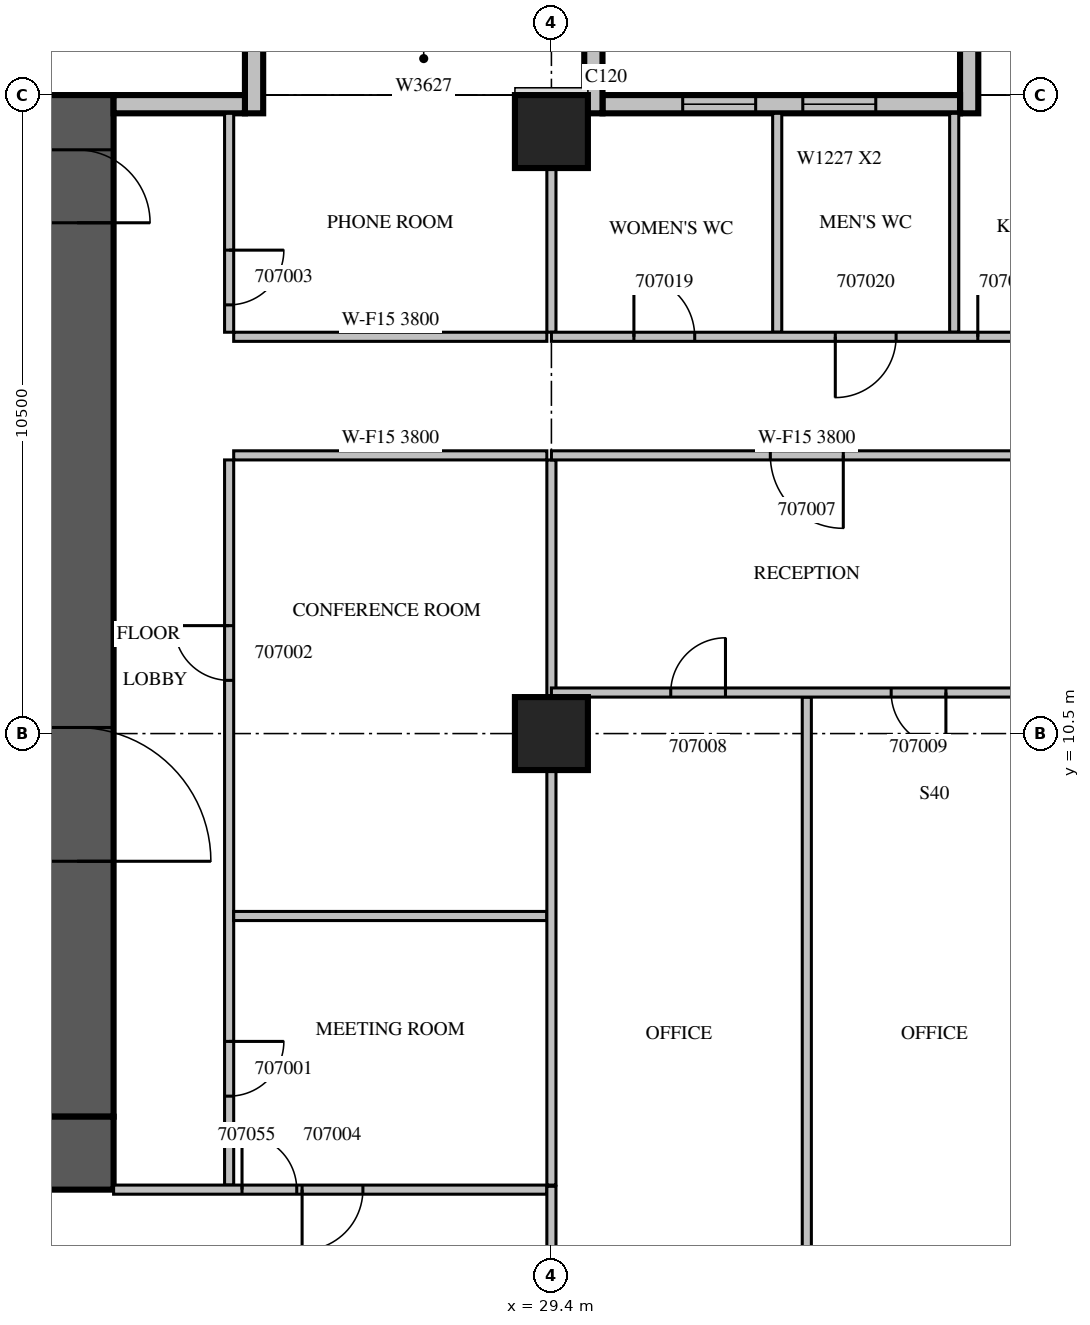
"""IFC4 building model, lengths in metres.
Left out: names, types, materials, properties, quantities, classifications, styles, units other than length and angle.
Written with IfcOpenShell. Run it as: python <this file> out.ifc"""

import sys

from ifc_helpers import new_model, si_unit, direction, frame, frame_2d, origin, origin_2d, place, context, subcontext, project, spatial, rectangle, extrude, source, transform, mapped, element, fill, save


model = new_model("IFC4")
c1 = context("Model", 3, precision=1e-05, world=origin(), true_north=direction((0.0, 1.0)))
c2 = subcontext(c1, "Body", "Model", "MODEL_VIEW")
j1 = project(units=[si_unit("LENGTHUNIT", "METRE"), si_unit("PLANEANGLEUNIT", "RADIAN")], contexts=[c1])
p1 = place(None, origin())
s1 = spatial("IfcSite", under=j1, at=p1, CompositionType="ELEMENT")
p2 = place(p1, origin())
s2 = spatial("IfcBuilding", under=s1, at=p2, CompositionType="ELEMENT")
p3 = place(p2, frame((0.0, 0.0, 40.5)))
s3 = spatial("IfcBuildingStorey", under=s2, at=p3, CompositionType="ELEMENT", Elevation=40.5)
m1 = source(origin(), c2, "Body", "SweptSolid", [
    extrude(rectangle(XDim=1.2, YDim=1.2, at=origin_2d()), origin(), (0.0, 0.0, 1.0), 4.2),
])
for number, where, z_axis, x_axis in (
    (1, (29.4, 10.5, 0.0), (0.0, 0.0, 1.0), (1.0, 0.0, 0.0)),
    (2, (29.4, 20.4, 0.0), (0.0, 0.0, 1.0), (1.0, 0.0, 0.0)),
):
    element("IfcColumn", number, at=place(p3, frame(where, z_axis=z_axis, x_axis=x_axis)), inside=s3, PredefinedType="COLUMN", context=c2, shape_type="MappedRepresentation", body=[
        mapped(m1, transform((0.0, 0.0, 0.0), scale=1.0)),
    ])
p4 = place(p3, frame((21.6, 4.2, 0.0), z_axis=(0.0, 0.0, 1.0), x_axis=(0.0, 1.0, 0.0)))
e3 = element("IfcWall", 3, at=p4, inside=s3, PredefinedType="SHEAR", context=c2, shape_type="SweptSolid", body=[
    extrude(rectangle(XDim=16.8, YDim=1.2, at=frame_2d((8.4, 0.0))), origin(), (0.0, 0.0, 1.0), 4.2),
])
m2 = source(origin(), c2, "Body", "SweptSolid", [
    extrude(rectangle(XDim=2.2, YDim=2.1, at=frame_2d((1.1, 1.05))), frame((0.0, 0.61, 0.0), z_axis=(0.0, -1.0, 0.0), x_axis=(1.0, 0.0, 0.0)), (0.0, 0.0, 1.0), 1.22),
])
p5 = place(p4, frame((4.2, 0.0, 0.0)))
e4 = element("IfcOpeningElement", 4, at=p5, cuts=e3, PredefinedType="OPENING", context=c2, shape_type="MappedRepresentation", body=[
    mapped(m2, transform((0.0, 0.0, 0.0), scale=1.0)),
])
m3 = source(origin(), c2, "Body", "SweptSolid", [
    extrude(rectangle(XDim=1.2, YDim=2.1, at=frame_2d((0.6, 1.05))), frame((0.0, 0.61, 0.0), z_axis=(0.0, -1.0, 0.0), x_axis=(1.0, 0.0, 0.0)), (0.0, 0.0, 1.0), 1.22),
])
p6 = place(p4, frame((14.7, 0.0, 0.0)))
e5 = element("IfcOpeningElement", 5, at=p6, cuts=e3, PredefinedType="OPENING", context=c2, shape_type="MappedRepresentation", body=[
    mapped(m3, transform((0.0, 0.0, 0.0), scale=1.0)),
])
m4 = source(origin(), c2, "Body", "SweptSolid", [
    extrude(rectangle(XDim=18.0, YDim=1.2, at=frame_2d((9.0, 0.0))), origin(), (0.0, 0.0, 1.0), 4.2),
])
p7 = place(p3, frame((4.2, 3.6, 0.0), z_axis=(0.0, 0.0, 1.0), x_axis=(1.0, 0.0, 0.0)))
e6 = element("IfcWall", 6, at=p7, inside=s3, PredefinedType="SHEAR", context=c2, shape_type="MappedRepresentation", body=[
    mapped(m4, transform((0.0, 0.0, 0.0), scale=1.0)),
])
m5 = source(origin(), c2, "Body", "SweptSolid", [
    extrude(rectangle(XDim=1.2, YDim=0.3, at=frame_2d((0.6, 0.0))), origin(), (0.0, 0.0, 1.0), 3.8),
])
p8 = place(p3, frame((36.27, 20.7, 0.0), z_axis=(0.0, 0.0, 1.0), x_axis=(0.0, 1.0, 0.0)))
e7 = element("IfcWall", 7, at=p8, inside=s3, PredefinedType="STANDARD", context=c2, shape_type="MappedRepresentation", body=[
    mapped(m5, transform((0.0, 0.0, 0.0), scale=1.0)),
])
m6 = source(origin(), c2, "Body", "SweptSolid", [
    extrude(rectangle(XDim=5.88, YDim=0.3, at=frame_2d((2.94, 0.0))), origin(), (0.0, 0.0, 1.0), 3.8),
])
p9 = place(p3, frame((36.12, 20.85, 0.0), z_axis=(0.0, 0.0, 1.0), x_axis=(-1.0, 0.0, 0.0)))
e8 = element("IfcWall", 8, at=p9, inside=s3, PredefinedType="STANDARD", context=c2, shape_type="MappedRepresentation", body=[
    mapped(m6, transform((0.0, 0.0, 0.0), scale=1.0)),
])
m7 = source(origin(), c2, "Body", "SweptSolid", [
    extrude(rectangle(XDim=1.2, YDim=2.7, at=frame_2d((0.6, 1.35))), frame((0.0, 0.16, 0.0), z_axis=(0.0, -1.0, 0.0), x_axis=(1.0, 0.0, 0.0)), (0.0, 0.0, 1.0), 0.32),
])
p10 = place(p9, frame((1.386, 0.0, 0.6)))
e9 = element("IfcOpeningElement", 9, at=p10, cuts=e8, PredefinedType="OPENING", context=c2, shape_type="MappedRepresentation", body=[
    mapped(m7, transform((0.0, 0.0, 0.0), scale=1.0)),
])
p11 = place(p9, frame((3.361, 0.0, 0.6)))
e10 = element("IfcOpeningElement", 10, at=p11, cuts=e8, PredefinedType="OPENING", context=c2, shape_type="MappedRepresentation", body=[
    mapped(m7, transform((0.0, 0.0, 0.0), scale=1.0)),
])
for number, where, z_axis, x_axis in (
    (11, (30.09, 20.7, 0.0), (0.0, 0.0, 1.0), (0.0, 1.0, 0.0)),
    (12, (24.51, 20.7, 0.0), (0.0, 0.0, 1.0), (0.0, 1.0, 0.0)),
):
    element("IfcWall", number, at=place(p3, frame(where, z_axis=z_axis, x_axis=x_axis)), inside=s3, PredefinedType="STANDARD", context=c2, shape_type="MappedRepresentation", body=[
        mapped(m5, transform((0.0, 0.0, 0.0), scale=1.0)),
    ])
p12 = place(p3, frame((24.36, 20.85, 0.0), z_axis=(0.0, 0.0, 1.0), x_axis=(-1.0, 0.0, 0.0)))
e13 = element("IfcWall", 13, at=p12, inside=s3, PredefinedType="STANDARD", context=c2, shape_type="SweptSolid", body=[
    extrude(rectangle(XDim=2.16, YDim=0.3, at=frame_2d((1.08, 0.0))), origin(), (0.0, 0.0, 1.0), 3.8),
])
p13 = place(p3, frame((24.1, 15.0, 0.0), z_axis=(0.0, 0.0, 1.0), x_axis=(0.0, -1.0, 0.0)))
e14 = element("IfcWall", 14, at=p13, inside=s3, PredefinedType="PARTITIONING", context=c2, shape_type="SweptSolid", body=[
    extrude(rectangle(XDim=11.925, YDim=0.15, at=frame_2d((5.963, 0.0))), origin(), (0.0, 0.0, 1.0), 3.8),
])
p14 = place(p13, frame((9.562, 0.0, 0.0)))
e15 = element("IfcOpeningElement", 15, at=p14, cuts=e14, PredefinedType="OPENING", context=c2, shape_type="SweptSolid", body=[
    extrude(rectangle(XDim=0.9, YDim=2.1, at=frame_2d((0.45, 1.05))), frame((0.0, 0.085, 0.0), z_axis=(0.0, -1.0, 0.0), x_axis=(1.0, 0.0, 0.0)), (0.0, 0.0, 1.0), 0.17),
])
m8 = source(origin(), c2, "Body", "SweptSolid", [
    extrude(rectangle(XDim=0.9, YDim=2.1, at=frame_2d((0.45, 1.05))), frame((0.0, 0.085, 0.0), z_axis=(0.0, -1.0, 0.0), x_axis=(1.0, 0.0, 0.0)), (0.0, 0.0, 1.0), 0.17),
])
p15 = place(p13, frame((2.725, 0.0, 0.0)))
e16 = element("IfcOpeningElement", 16, at=p15, cuts=e14, PredefinedType="OPENING", context=c2, shape_type="MappedRepresentation", body=[
    mapped(m8, transform((0.0, 0.0, 0.0), scale=1.0)),
])
p16 = place(p3, frame((24.1, 20.7, 0.0), z_axis=(0.0, 0.0, 1.0), x_axis=(0.0, -1.0, 0.0)))
e17 = element("IfcWall", 17, at=p16, inside=s3, PredefinedType="PARTITIONING", context=c2, shape_type="SweptSolid", body=[
    extrude(rectangle(XDim=3.6, YDim=0.15, at=frame_2d((1.8, 0.0))), origin(), (0.0, 0.0, 1.0), 3.8),
])
p17 = place(p16, frame((2.25, 0.0, 0.0)))
e18 = element("IfcOpeningElement", 18, at=p17, cuts=e17, PredefinedType="OPENING", context=c2, shape_type="MappedRepresentation", body=[
    mapped(m8, transform((0.0, 0.0, 0.0), scale=1.0)),
])
p18 = place(p3, frame((29.325, 7.5, 0.0), z_axis=(0.0, 0.0, 1.0), x_axis=(-1.0, 0.0, 0.0)))
e19 = element("IfcWall", 19, at=p18, inside=s3, PredefinedType="PARTITIONING", context=c2, shape_type="SweptSolid", body=[
    extrude(rectangle(XDim=5.15, YDim=0.15, at=frame_2d((2.575, 0.0))), origin(), (0.0, 0.0, 1.0), 3.8),
])
m9 = source(origin(), c2, "Body", "SweptSolid", [
    extrude(rectangle(XDim=5.15, YDim=0.15, at=frame_2d((2.575, 0.0))), origin(), (0.0, 0.0, 1.0), 3.8),
])
for number, where, z_axis, x_axis in (
    (20, (29.325, 15.075, 0.0), (0.0, 0.0, 1.0), (-1.0, 0.0, 0.0)),
    (21, (24.175, 17.025, 0.0), (0.0, 0.0, 1.0), (1.0, 0.0, 0.0)),
):
    element("IfcWall", number, at=place(p3, frame(where, z_axis=z_axis, x_axis=x_axis)), inside=s3, PredefinedType="PARTITIONING", context=c2, shape_type="MappedRepresentation", body=[
        mapped(m9, transform((0.0, 0.0, 0.0), scale=1.0)),
    ])
p19 = place(p3, frame((29.4, 3.075, 0.0), z_axis=(0.0, 0.0, 1.0), x_axis=(0.0, 1.0, 0.0)))
e22 = element("IfcWall", 22, at=p19, inside=s3, PredefinedType="PARTITIONING", context=c2, shape_type="SweptSolid", body=[
    extrude(rectangle(XDim=6.826, YDim=0.15, at=frame_2d((3.413, 0.0))), origin(), (0.0, 0.0, 1.0), 3.8),
])
p20 = place(p3, frame((29.4, 11.099, 0.0), z_axis=(0.0, 0.0, 1.0), x_axis=(0.0, 1.0, 0.0)))
e23 = element("IfcWall", 23, at=p20, inside=s3, PredefinedType="PARTITIONING", context=c2, shape_type="SweptSolid", body=[
    extrude(rectangle(XDim=3.901, YDim=0.15, at=frame_2d((1.95, 0.0))), origin(), (0.0, 0.0, 1.0), 3.8),
])
p21 = place(p3, frame((29.4, 17.1, 0.0), z_axis=(0.0, 0.0, 1.0), x_axis=(0.0, 1.0, 0.0)))
e24 = element("IfcWall", 24, at=p21, inside=s3, PredefinedType="PARTITIONING", context=c2, shape_type="SweptSolid", body=[
    extrude(rectangle(XDim=2.701, YDim=0.15, at=frame_2d((1.351, 0.0))), origin(), (0.0, 0.0, 1.0), 3.8),
])
p22 = place(p3, frame((22.2, 3.0, 0.0), z_axis=(0.0, 0.0, 1.0), x_axis=(1.0, 0.0, 0.0)))
e25 = element("IfcWall", 25, at=p22, inside=s3, PredefinedType="PARTITIONING", context=c2, shape_type="SweptSolid", body=[
    extrude(rectangle(XDim=7.125, YDim=0.15, at=frame_2d((3.562, 0.0))), origin(), (0.0, 0.0, 1.0), 3.8),
])
p23 = place(p22, frame((3.1, 0.0, 0.0)))
e26 = element("IfcOpeningElement", 26, at=p23, cuts=e25, PredefinedType="OPENING", context=c2, shape_type="SweptSolid", body=[
    extrude(rectangle(XDim=1.0, YDim=2.1, at=frame_2d((0.5, 1.05))), frame((0.0, 0.085, 0.0), z_axis=(0.0, -1.0, 0.0), x_axis=(1.0, 0.0, 0.0)), (0.0, 0.0, 1.0), 0.17),
])
p24 = place(p22, frame((2.112, 0.0, 0.0)))
e27 = element("IfcOpeningElement", 27, at=p24, cuts=e25, PredefinedType="OPENING", context=c2, shape_type="MappedRepresentation", body=[
    mapped(m8, transform((0.0, 0.0, 0.0), scale=1.0)),
])
p25 = place(p3, frame((33.6, 0.3, 0.0), z_axis=(0.0, 0.0, 1.0), x_axis=(0.0, 1.0, 0.0)))
e28 = element("IfcWall", 28, at=p25, inside=s3, PredefinedType="PARTITIONING", context=c2, shape_type="SweptSolid", body=[
    extrude(rectangle(XDim=10.8, YDim=0.15, at=frame_2d((5.4, 0.0))), origin(), (0.0, 0.0, 1.0), 3.8),
])
p26 = place(p3, frame((29.4, 1.199, 0.0), z_axis=(0.0, 0.0, 1.0), x_axis=(0.0, 1.0, 0.0)))
e29 = element("IfcWall", 29, at=p26, inside=s3, PredefinedType="PARTITIONING", context=c2, shape_type="SweptSolid", body=[
    extrude(rectangle(XDim=1.856, YDim=0.15, at=frame_2d((0.928, 0.0))), origin(), (0.0, 0.0, 1.0), 3.8),
])
p27 = place(p3, frame((37.8, 11.175, 0.0), z_axis=(0.0, 0.0, 1.0), x_axis=(-1.0, 0.0, 0.0)))
e30 = element("IfcWall", 30, at=p27, inside=s3, PredefinedType="PARTITIONING", context=c2, shape_type="SweptSolid", body=[
    extrude(rectangle(XDim=8.4, YDim=0.15, at=frame_2d((4.2, 0.0))), origin(), (0.0, 0.0, 1.0), 3.8),
])
p28 = place(p27, frame((5.537, 0.0, 0.0)))
e31 = element("IfcOpeningElement", 31, at=p28, cuts=e30, PredefinedType="OPENING", context=c2, shape_type="MappedRepresentation", body=[
    mapped(m8, transform((0.0, 0.0, 0.0), scale=1.0)),
])
p29 = place(p27, frame((1.913, 0.0, 0.0)))
e32 = element("IfcOpeningElement", 32, at=p29, cuts=e30, PredefinedType="OPENING", context=c2, shape_type="MappedRepresentation", body=[
    mapped(m8, transform((0.0, 0.0, 0.0), scale=1.0)),
])
m10 = source(origin(), c2, "Body", "SweptSolid", [
    extrude(rectangle(XDim=3.6, YDim=0.15, at=frame_2d((1.8, 0.0))), origin(), (0.0, 0.0, 1.0), 3.8),
])
for number, where, z_axis, x_axis in (
    (33, (33.113, 20.7, 0.0), (0.0, 0.0, 1.0), (0.0, -1.0, 0.0)),
    (34, (36.024, 20.7, 0.0), (0.0, 0.0, 1.0), (0.0, -1.0, 0.0)),
):
    element("IfcWall", number, at=place(p3, frame(where, z_axis=z_axis, x_axis=x_axis)), inside=s3, PredefinedType="PARTITIONING", context=c2, shape_type="MappedRepresentation", body=[
        mapped(m10, transform((0.0, 0.0, 0.0), scale=1.0)),
    ])
m11 = source(origin(), c2, "Body", "SweptSolid", [
    extrude(rectangle(XDim=8.4, YDim=0.15, at=frame_2d((4.2, 0.0))), origin(), (0.0, 0.0, 1.0), 3.8),
])
p30 = place(p3, frame((37.8, 15.075, 0.0), z_axis=(0.0, 0.0, 1.0), x_axis=(-1.0, 0.0, 0.0)))
e35 = element("IfcWall", 35, at=p30, inside=s3, PredefinedType="PARTITIONING", context=c2, shape_type="MappedRepresentation", body=[
    mapped(m11, transform((0.0, 0.0, 0.0), scale=1.0)),
])
p31 = place(p30, frame((3.6, 0.0, 0.0)))
e36 = element("IfcOpeningElement", 36, at=p31, cuts=e35, PredefinedType="OPENING", context=c2, shape_type="SweptSolid", body=[
    extrude(rectangle(XDim=1.2, YDim=2.1, at=frame_2d((0.6, 1.05))), frame((0.0, 0.085, 0.0), z_axis=(0.0, -1.0, 0.0), x_axis=(1.0, 0.0, 0.0)), (0.0, 0.0, 1.0), 0.17),
])
p32 = place(p3, frame((29.4, 17.025, 0.0), z_axis=(0.0, 0.0, 1.0), x_axis=(1.0, 0.0, 0.0)))
e37 = element("IfcWall", 37, at=p32, inside=s3, PredefinedType="PARTITIONING", context=c2, shape_type="SweptSolid", body=[
    extrude(rectangle(XDim=37.5, YDim=0.15, at=frame_2d((18.75, 0.0))), origin(), (0.0, 0.0, 1.0), 3.8),
])
m12 = source(origin(), c2, "Body", "SweptSolid", [
    extrude(rectangle(XDim=1.0, YDim=2.1, at=frame_2d((0.5, 1.05))), frame((0.0, 0.085, 0.0), z_axis=(0.0, -1.0, 0.0), x_axis=(1.0, 0.0, 0.0)), (0.0, 0.0, 1.0), 0.17),
])
p33 = place(p32, frame((1.357, 0.0, 0.0)))
e38 = element("IfcOpeningElement", 38, at=p33, cuts=e37, PredefinedType="OPENING", context=c2, shape_type="MappedRepresentation", body=[
    mapped(m12, transform((0.0, 0.0, 0.0), scale=1.0)),
])
p34 = place(p32, frame((4.669, 0.0, 0.0)))
e39 = element("IfcOpeningElement", 39, at=p34, cuts=e37, PredefinedType="OPENING", context=c2, shape_type="MappedRepresentation", body=[
    mapped(m12, transform((0.0, 0.0, 0.0), scale=1.0)),
])
p35 = place(p32, frame((7.012, 0.0, 0.0)))
e40 = element("IfcOpeningElement", 40, at=p35, cuts=e37, PredefinedType="OPENING", context=c2, shape_type="MappedRepresentation", body=[
    mapped(m12, transform((0.0, 0.0, 0.0), scale=1.0)),
])
m13 = source(origin(), c2, "Body", "SweptSolid", [
    extrude(rectangle(XDim=1.2, YDim=2.1, at=frame_2d((0.6, 1.05))), frame((0.0, 0.085, 0.0), z_axis=(0.0, -1.0, 0.0), x_axis=(1.0, 0.0, 0.0)), (0.0, 0.0, 1.0), 0.17),
])
p36 = place(p32, frame((12.0, 0.0, 0.0)))
e41 = element("IfcOpeningElement", 41, at=p36, cuts=e37, PredefinedType="OPENING", context=c2, shape_type="MappedRepresentation", body=[
    mapped(m13, transform((0.0, 0.0, 0.0), scale=1.0)),
])
p37 = place(p32, frame((19.24, 0.0, 0.0)))
e42 = element("IfcOpeningElement", 42, at=p37, cuts=e37, PredefinedType="OPENING", context=c2, shape_type="MappedRepresentation", body=[
    mapped(m12, transform((0.0, 0.0, 0.0), scale=1.0)),
])
p38 = place(p32, frame((25.17, 0.0, 0.0)))
e43 = element("IfcOpeningElement", 43, at=p38, cuts=e37, PredefinedType="OPENING", context=c2, shape_type="MappedRepresentation", body=[
    mapped(m8, transform((0.0, 0.0, 0.0), scale=1.0)),
])
p39 = place(p32, frame((30.052, 0.0, 0.0)))
e44 = element("IfcOpeningElement", 44, at=p39, cuts=e37, PredefinedType="OPENING", context=c2, shape_type="MappedRepresentation", body=[
    mapped(m12, transform((0.0, 0.0, 0.0), scale=1.0)),
])
p40 = place(p32, frame((33.608, 0.0, 0.0)))
e45 = element("IfcOpeningElement", 45, at=p40, cuts=e37, PredefinedType="OPENING", context=c2, shape_type="MappedRepresentation", body=[
    mapped(m12, transform((0.0, 0.0, 0.0), scale=1.0)),
])
p41 = place(p32, frame((36.124, 0.0, 0.0)))
e46 = element("IfcOpeningElement", 46, at=p41, cuts=e37, PredefinedType="OPENING", context=c2, shape_type="MappedRepresentation", body=[
    mapped(m12, transform((0.0, 0.0, 0.0), scale=1.0)),
])
m14 = source(origin(), c2, "Body", "SweptSolid", [
    extrude(rectangle(XDim=1.2, YDim=2.7, at=frame_2d((0.6, 1.35))), frame((0.0, 0.03, 0.0), z_axis=(0.0, -1.0, 0.0), x_axis=(1.0, 0.0, 0.0)), (0.0, 0.0, 1.0), 0.06),
])
p42 = place(p10, origin())
e47 = element("IfcWindow", 47, at=p42, inside=s3, PartitioningType="SINGLE_PANEL", PredefinedType="WINDOW", context=c2, shape_type="MappedRepresentation", body=[
    mapped(m14, transform((0.0, 0.0, 0.0), scale=1.0)),
])
fill(e9, e47)
p43 = place(p11, origin())
e48 = element("IfcWindow", 48, at=p43, inside=s3, PartitioningType="SINGLE_PANEL", PredefinedType="WINDOW", context=c2, shape_type="MappedRepresentation", body=[
    mapped(m14, transform((0.0, 0.0, 0.0), scale=1.0)),
])
fill(e10, e48)
m15 = source(origin(), c2, "Body", "SweptSolid", [
    extrude(rectangle(XDim=2.2, YDim=2.1, at=frame_2d((1.1, 1.05))), frame((0.0, 0.025, 0.0), z_axis=(0.0, -1.0, 0.0), x_axis=(1.0, 0.0, 0.0)), (0.0, 0.0, 1.0), 0.05),
])
p44 = place(p5, origin())
e49 = element("IfcDoor", 49, at=p44, inside=s3, OperationType="DOUBLE_DOOR_SINGLE_SWING", PredefinedType="DOOR", context=c2, shape_type="MappedRepresentation", body=[
    mapped(m15, transform((0.0, 0.0, 0.0), scale=1.0)),
])
fill(e4, e49)
m16 = source(origin(), c2, "Body", "SweptSolid", [
    extrude(rectangle(XDim=1.2, YDim=2.1, at=frame_2d((0.6, 1.05))), frame((0.0, 0.025, 0.0), z_axis=(0.0, -1.0, 0.0), x_axis=(1.0, 0.0, 0.0)), (0.0, 0.0, 1.0), 0.05),
])
p45 = place(p6, origin())
e50 = element("IfcDoor", 50, at=p45, inside=s3, OperationType="SINGLE_SWING_RIGHT", PredefinedType="DOOR", context=c2, shape_type="MappedRepresentation", body=[
    mapped(m16, transform((0.0, 0.0, 0.0), scale=1.0)),
])
fill(e5, e50)
m17 = source(origin(), c2, "Body", "SweptSolid", [
    extrude(rectangle(XDim=0.9, YDim=2.1, at=frame_2d((0.45, 1.05))), frame((0.0, 0.025, 0.0), z_axis=(0.0, -1.0, 0.0), x_axis=(1.0, 0.0, 0.0)), (0.0, 0.0, 1.0), 0.05),
])
p46 = place(p14, origin())
e51 = element("IfcDoor", 51, at=p46, inside=s3, OperationType="SINGLE_SWING_LEFT", PredefinedType="DOOR", context=c2, shape_type="MappedRepresentation", body=[
    mapped(m17, transform((0.0, 0.0, 0.0), scale=1.0)),
])
fill(e15, e51)
p47 = place(p15, origin())
e52 = element("IfcDoor", 52, at=p47, inside=s3, OperationType="SINGLE_SWING_RIGHT", PredefinedType="DOOR", context=c2, shape_type="MappedRepresentation", body=[
    mapped(m17, transform((0.0, 0.0, 0.0), scale=1.0)),
])
fill(e16, e52)
p48 = place(p17, origin())
e53 = element("IfcDoor", 53, at=p48, inside=s3, OperationType="SINGLE_SWING_LEFT", PredefinedType="DOOR", context=c2, shape_type="MappedRepresentation", body=[
    mapped(m17, transform((0.0, 0.0, 0.0), scale=1.0)),
])
fill(e18, e53)
m18 = source(origin(), c2, "Body", "SweptSolid", [
    extrude(rectangle(XDim=1.0, YDim=2.1, at=frame_2d((0.5, 1.05))), frame((0.0, 0.025, 0.0), z_axis=(0.0, -1.0, 0.0), x_axis=(1.0, 0.0, 0.0)), (0.0, 0.0, 1.0), 0.05),
])
p49 = place(p23, origin())
e54 = element("IfcDoor", 54, at=p49, inside=s3, OperationType="SINGLE_SWING_RIGHT", PredefinedType="DOOR", context=c2, shape_type="MappedRepresentation", body=[
    mapped(m18, transform((0.0, 0.0, 0.0), scale=1.0)),
])
fill(e26, e54)
p50 = place(p31, origin())
e55 = element("IfcDoor", 55, at=p50, inside=s3, OperationType="SINGLE_SWING_LEFT", PredefinedType="DOOR", context=c2, shape_type="MappedRepresentation", body=[
    mapped(m16, transform((0.0, 0.0, 0.0), scale=1.0)),
])
fill(e36, e55)
p51 = place(p28, origin())
e56 = element("IfcDoor", 56, at=p51, inside=s3, OperationType="SINGLE_SWING_RIGHT", PredefinedType="DOOR", context=c2, shape_type="MappedRepresentation", body=[
    mapped(m17, transform((0.0, 0.0, 0.0), scale=1.0)),
])
fill(e31, e56)
p52 = place(p29, origin())
e57 = element("IfcDoor", 57, at=p52, inside=s3, OperationType="SINGLE_SWING_LEFT", PredefinedType="DOOR", context=c2, shape_type="MappedRepresentation", body=[
    mapped(m17, transform((0.0, 0.0, 0.0), scale=1.0)),
])
fill(e32, e57)
p53 = place(p33, origin())
e58 = element("IfcDoor", 58, at=p53, inside=s3, OperationType="SINGLE_SWING_LEFT", PredefinedType="DOOR", context=c2, shape_type="MappedRepresentation", body=[
    mapped(m18, transform((0.0, 0.0, 0.0), scale=1.0)),
])
fill(e38, e58)
p54 = place(p34, origin())
e59 = element("IfcDoor", 59, at=p54, inside=s3, OperationType="SINGLE_SWING_RIGHT", PredefinedType="DOOR", context=c2, shape_type="MappedRepresentation", body=[
    mapped(m18, transform((0.0, 0.0, 0.0), scale=1.0)),
])
fill(e39, e59)
p55 = place(p35, origin())
e60 = element("IfcDoor", 60, at=p55, inside=s3, OperationType="SINGLE_SWING_LEFT", PredefinedType="DOOR", context=c2, shape_type="MappedRepresentation", body=[
    mapped(m18, transform((0.0, 0.0, 0.0), scale=1.0)),
])
fill(e40, e60)
p56 = place(p24, origin())
e61 = element("IfcDoor", 61, at=p56, inside=s3, OperationType="SINGLE_SWING_LEFT", PredefinedType="DOOR", context=c2, shape_type="MappedRepresentation", body=[
    mapped(m17, transform((0.0, 0.0, 0.0), scale=1.0)),
])
fill(e27, e61)
save(model, sys.argv[1])
